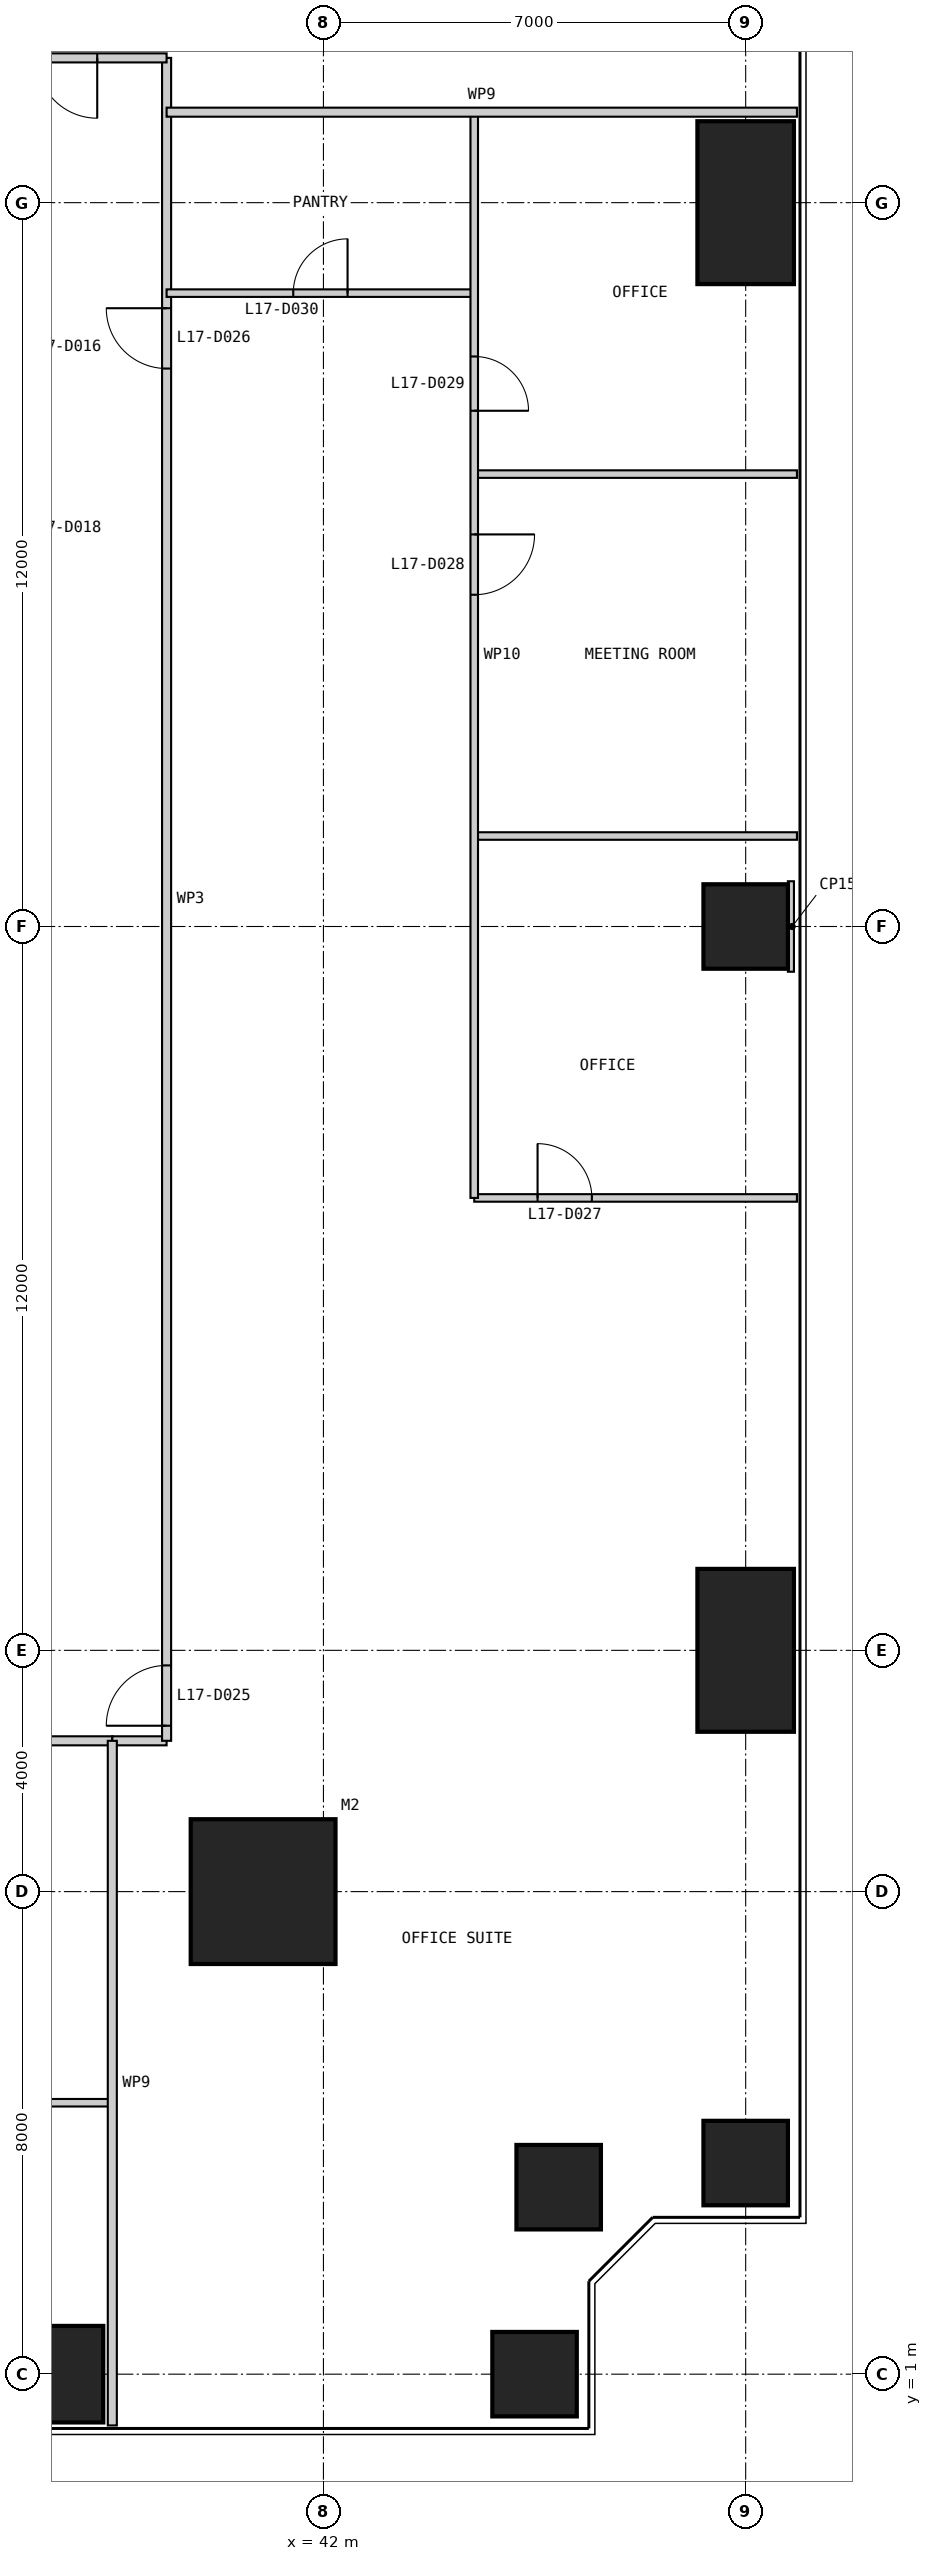
"""IFC4 building model, lengths in metres.
Left out: names, types, materials, properties, quantities, classifications, styles, units other than length and angle.
Written with IfcOpenShell. Run it as: python <this file> out.ifc"""

import sys

from ifc_helpers import new_model, si_unit, direction, frame, frame_2d, origin, origin_2d, place, context, subcontext, project, spatial, rectangle, extrude, element, fill, save


model = new_model("IFC4")
c1 = context("Model", 3, precision=1e-05, world=origin(), true_north=direction((0.0, 1.0)))
c2 = subcontext(c1, "Body", "Model", "MODEL_VIEW")
j1 = project(units=[si_unit("LENGTHUNIT", "METRE"), si_unit("PLANEANGLEUNIT", "RADIAN")], contexts=[c1])
p1 = place(None, origin())
s1 = spatial("IfcSite", under=j1, at=p1, CompositionType="ELEMENT")
p2 = place(p1, origin())
s2 = spatial("IfcBuilding", under=s1, at=p2, CompositionType="ELEMENT")
p3 = place(p2, frame((0.0, 0.0, 75.0)))
s3 = spatial("IfcBuildingStorey", under=s2, at=p3, CompositionType="ELEMENT", Elevation=75.0)
p4 = place(p3, frame((41.0, 9.0, 0.0), z_axis=(0.0, 0.0, 1.0), x_axis=(1.0, 0.0, 0.0)))
e1 = element("IfcColumn", 1, at=p4, inside=s3, PredefinedType="COLUMN", context=c2, shape_type="SweptSolid", body=[
    extrude(rectangle(XDim=2.4, YDim=2.4, at=origin_2d()), origin(), (0.0, 0.0, 1.0), 4.0),
])
p5 = place(p3, frame((37.0, 1.0, 0.0), z_axis=(0.0, 0.0, 1.0), x_axis=(1.0, 0.0, 0.0)))
e2 = element("IfcColumn", 2, at=p5, inside=s3, PredefinedType="COLUMN", context=c2, shape_type="SweptSolid", body=[
    extrude(rectangle(XDim=2.7, YDim=1.6, at=origin_2d()), origin(), (0.0, 0.0, 1.0), 4.0),
])
for number, where, z_axis, x_axis in (
    (3, (45.5, 1.0, 0.0), (0.0, 0.0, 1.0), (1.0, 0.0, 0.0)),
    (4, (45.9, 4.1, 0.0), (0.0, 0.0, 1.0), (1.0, 0.0, 0.0)),
    (5, (49.0, 4.5, 0.0), (0.0, 0.0, 1.0), (1.0, 0.0, 0.0)),
):
    element("IfcColumn", number, at=place(p3, frame(where, z_axis=z_axis, x_axis=x_axis)), inside=s3, PredefinedType="COLUMN", context=c2, shape_type="SweptSolid", body=[
        extrude(rectangle(XDim=1.4, YDim=1.4, at=origin_2d()), origin(), (0.0, 0.0, 1.0), 4.0),
    ])
p6 = place(p3, frame((49.0, 13.0, 0.0), z_axis=(0.0, 0.0, 1.0), x_axis=(1.0, 0.0, 0.0)))
e6 = element("IfcColumn", 6, at=p6, inside=s3, PredefinedType="COLUMN", context=c2, shape_type="SweptSolid", body=[
    extrude(rectangle(XDim=1.6, YDim=2.7, at=origin_2d()), origin(), (0.0, 0.0, 1.0), 4.0),
])
p7 = place(p3, frame((49.0, 25.0, 0.0), z_axis=(0.0, 0.0, 1.0), x_axis=(1.0, 0.0, 0.0)))
e7 = element("IfcColumn", 7, at=p7, inside=s3, PredefinedType="COLUMN", context=c2, shape_type="SweptSolid", body=[
    extrude(rectangle(XDim=1.4, YDim=1.4, at=origin_2d()), origin(), (0.0, 0.0, 1.0), 4.0),
])
p8 = place(p3, frame((49.0, 37.0, 0.0), z_axis=(0.0, 0.0, 1.0), x_axis=(1.0, 0.0, 0.0)))
e8 = element("IfcColumn", 8, at=p8, inside=s3, PredefinedType="COLUMN", context=c2, shape_type="SweptSolid", body=[
    extrude(rectangle(XDim=1.6, YDim=2.7, at=origin_2d()), origin(), (0.0, 0.0, 1.0), 4.0),
])
p9 = place(p3, frame((11.5, 11.5, 0.0), z_axis=(0.0, 0.0, 1.0), x_axis=(1.0, 0.0, 0.0)))
e9 = element("IfcWall", 9, at=p9, inside=s3, PredefinedType="PARTITIONING", context=c2, shape_type="SweptSolid", body=[
    extrude(rectangle(XDim=27.0, YDim=0.15, at=frame_2d((13.5, 0.0))), origin(), (0.0, 0.0, 1.0), 3.85),
])
p10 = place(p9, frame((11.5, 0.0, 0.0)))
e10 = element("IfcOpeningElement", 10, at=p10, cuts=e9, PredefinedType="OPENING", context=c2, shape_type="SweptSolid", body=[
    extrude(rectangle(XDim=1.0, YDim=2.2, at=frame_2d((0.5, 1.1))), frame((0.0, 0.085, 0.0), z_axis=(0.0, -1.0, 0.0), x_axis=(1.0, 0.0, 0.0)), (0.0, 0.0, 1.0), 0.17),
])
p11 = place(p3, frame((14.5, 5.5, 0.0), z_axis=(0.0, 0.0, 1.0), x_axis=(1.0, 0.0, 0.0)))
e11 = element("IfcWall", 11, at=p11, inside=s3, PredefinedType="PARTITIONING", context=c2, shape_type="SweptSolid", body=[
    extrude(rectangle(XDim=24.0, YDim=0.125, at=frame_2d((12.0, 0.0))), origin(), (0.0, 0.0, 1.0), 3.85),
])
p12 = place(p11, frame((10.05, 0.0, 0.0)))
e12 = element("IfcOpeningElement", 12, at=p12, cuts=e11, PredefinedType="OPENING", context=c2, shape_type="SweptSolid", body=[
    extrude(rectangle(XDim=0.9, YDim=2.2, at=frame_2d((0.45, 1.1))), frame((0.0, 0.073, 0.0), z_axis=(0.0, -1.0, 0.0), x_axis=(1.0, 0.0, 0.0)), (0.0, 0.0, 1.0), 0.145),
])
p13 = place(p11, frame((16.05, 0.0, 0.0)))
e13 = element("IfcOpeningElement", 13, at=p13, cuts=e11, PredefinedType="OPENING", context=c2, shape_type="SweptSolid", body=[
    extrude(rectangle(XDim=0.9, YDim=2.2, at=frame_2d((0.45, 1.1))), frame((0.0, 0.073, 0.0), z_axis=(0.0, -1.0, 0.0), x_axis=(1.0, 0.0, 0.0)), (0.0, 0.0, 1.0), 0.145),
])
p14 = place(p11, frame((19.05, 0.0, 0.0)))
e14 = element("IfcOpeningElement", 14, at=p14, cuts=e11, PredefinedType="OPENING", context=c2, shape_type="SweptSolid", body=[
    extrude(rectangle(XDim=0.9, YDim=2.2, at=frame_2d((0.45, 1.1))), frame((0.0, 0.073, 0.0), z_axis=(0.0, -1.0, 0.0), x_axis=(1.0, 0.0, 0.0)), (0.0, 0.0, 1.0), 0.145),
])
p15 = place(p3, frame((38.5, 11.5, 0.0), z_axis=(0.0, 0.0, 1.0), x_axis=(1.0, 0.0, 0.0)))
e15 = element("IfcWall", 15, at=p15, inside=s3, PredefinedType="PARTITIONING", context=c2, shape_type="SweptSolid", body=[
    extrude(rectangle(XDim=0.9, YDim=0.15, at=frame_2d((0.45, 0.0))), origin(), (0.0, 0.0, 1.0), 3.85),
])
p16 = place(p3, frame((39.4, 11.5, 0.0), z_axis=(0.0, 0.0, 1.0), x_axis=(0.0, 1.0, 0.0)))
e16 = element("IfcWall", 16, at=p16, inside=s3, PredefinedType="PARTITIONING", context=c2, shape_type="SweptSolid", body=[
    extrude(rectangle(XDim=27.9, YDim=0.15, at=frame_2d((13.95, 0.0))), origin(), (0.0, 0.0, 1.0), 3.85),
])
p17 = place(p16, frame((0.25, 0.0, 0.0)))
e17 = element("IfcOpeningElement", 17, at=p17, cuts=e16, PredefinedType="OPENING", context=c2, shape_type="SweptSolid", body=[
    extrude(rectangle(XDim=1.0, YDim=2.2, at=frame_2d((0.5, 1.1))), frame((0.0, 0.085, 0.0), z_axis=(0.0, -1.0, 0.0), x_axis=(1.0, 0.0, 0.0)), (0.0, 0.0, 1.0), 0.17),
])
p18 = place(p16, frame((22.75, 0.0, 0.0)))
e18 = element("IfcOpeningElement", 18, at=p18, cuts=e16, PredefinedType="OPENING", context=c2, shape_type="SweptSolid", body=[
    extrude(rectangle(XDim=1.0, YDim=2.2, at=frame_2d((0.5, 1.1))), frame((0.0, 0.085, 0.0), z_axis=(0.0, -1.0, 0.0), x_axis=(1.0, 0.0, 0.0)), (0.0, 0.0, 1.0), 0.17),
])
p19 = place(p3, frame((38.5, 0.15, 0.0), z_axis=(0.0, 0.0, 1.0), x_axis=(0.0, 1.0, 0.0)))
e19 = element("IfcWall", 19, at=p19, inside=s3, PredefinedType="PARTITIONING", context=c2, shape_type="SweptSolid", body=[
    extrude(rectangle(XDim=11.35, YDim=0.15, at=frame_2d((5.675, 0.0))), origin(), (0.0, 0.0, 1.0), 3.85),
])
p20 = place(p3, frame((49.85, 20.5, 0.0), z_axis=(0.0, 0.0, 1.0), x_axis=(-1.0, 0.0, 0.0)))
e20 = element("IfcWall", 20, at=p20, inside=s3, PredefinedType="PARTITIONING", context=c2, shape_type="SweptSolid", body=[
    extrude(rectangle(XDim=5.35, YDim=0.125, at=frame_2d((2.675, 0.0))), origin(), (0.0, 0.0, 1.0), 3.85),
])
p21 = place(p20, frame((3.4, 0.0, 0.0)))
e21 = element("IfcOpeningElement", 21, at=p21, cuts=e20, PredefinedType="OPENING", context=c2, shape_type="SweptSolid", body=[
    extrude(rectangle(XDim=0.9, YDim=2.2, at=frame_2d((0.45, 1.1))), frame((0.0, 0.073, 0.0), z_axis=(0.0, -1.0, 0.0), x_axis=(1.0, 0.0, 0.0)), (0.0, 0.0, 1.0), 0.145),
])
for number, where, z_axis, x_axis in (
    (22, (49.85, 26.5, 0.0), (0.0, 0.0, 1.0), (-1.0, 0.0, 0.0)),
    (23, (49.85, 32.5, 0.0), (0.0, 0.0, 1.0), (-1.0, 0.0, 0.0)),
):
    element("IfcWall", number, at=place(p3, frame(where, z_axis=z_axis, x_axis=x_axis)), inside=s3, PredefinedType="PARTITIONING", context=c2, shape_type="SweptSolid", body=[
        extrude(rectangle(XDim=5.35, YDim=0.125, at=frame_2d((2.675, 0.0))), origin(), (0.0, 0.0, 1.0), 3.85),
    ])
p22 = place(p3, frame((44.5, 35.5, 0.0), z_axis=(0.0, 0.0, 1.0), x_axis=(-1.0, 0.0, 0.0)))
e24 = element("IfcWall", 24, at=p22, inside=s3, PredefinedType="PARTITIONING", context=c2, shape_type="SweptSolid", body=[
    extrude(rectangle(XDim=5.1, YDim=0.125, at=frame_2d((2.55, 0.0))), origin(), (0.0, 0.0, 1.0), 3.85),
])
p23 = place(p22, frame((2.1, 0.0, 0.0)))
e25 = element("IfcOpeningElement", 25, at=p23, cuts=e24, PredefinedType="OPENING", context=c2, shape_type="SweptSolid", body=[
    extrude(rectangle(XDim=0.9, YDim=2.2, at=frame_2d((0.45, 1.1))), frame((0.0, 0.073, 0.0), z_axis=(0.0, -1.0, 0.0), x_axis=(1.0, 0.0, 0.0)), (0.0, 0.0, 1.0), 0.145),
])
p24 = place(p3, frame((44.5, 20.5, 0.0), z_axis=(0.0, 0.0, 1.0), x_axis=(0.0, 1.0, 0.0)))
e26 = element("IfcWall", 26, at=p24, inside=s3, PredefinedType="PARTITIONING", context=c2, shape_type="SweptSolid", body=[
    extrude(rectangle(XDim=18.0, YDim=0.125, at=frame_2d((9.0, 0.0))), origin(), (0.0, 0.0, 1.0), 3.85),
])
p25 = place(p24, frame((10.0, 0.0, 0.0)))
e27 = element("IfcOpeningElement", 27, at=p25, cuts=e26, PredefinedType="OPENING", context=c2, shape_type="SweptSolid", body=[
    extrude(rectangle(XDim=1.0, YDim=2.2, at=frame_2d((0.5, 1.1))), frame((0.0, 0.073, 0.0), z_axis=(0.0, -1.0, 0.0), x_axis=(1.0, 0.0, 0.0)), (0.0, 0.0, 1.0), 0.145),
])
p26 = place(p24, frame((13.05, 0.0, 0.0)))
e28 = element("IfcOpeningElement", 28, at=p26, cuts=e26, PredefinedType="OPENING", context=c2, shape_type="SweptSolid", body=[
    extrude(rectangle(XDim=0.9, YDim=2.2, at=frame_2d((0.45, 1.1))), frame((0.0, 0.073, 0.0), z_axis=(0.0, -1.0, 0.0), x_axis=(1.0, 0.0, 0.0)), (0.0, 0.0, 1.0), 0.145),
])
p27 = place(p3, frame((39.4, 39.4, 0.0), z_axis=(0.0, 0.0, 1.0), x_axis=(-1.0, 0.0, 0.0)))
e29 = element("IfcWall", 29, at=p27, inside=s3, PredefinedType="PARTITIONING", context=c2, shape_type="SweptSolid", body=[
    extrude(rectangle(XDim=28.8, YDim=0.15, at=frame_2d((14.4, 0.0))), origin(), (0.0, 0.0, 1.0), 3.85),
])
p28 = place(p27, frame((1.15, 0.0, 0.0)))
e30 = element("IfcOpeningElement", 30, at=p28, cuts=e29, PredefinedType="OPENING", context=c2, shape_type="SweptSolid", body=[
    extrude(rectangle(XDim=1.0, YDim=2.2, at=frame_2d((0.5, 1.1))), frame((0.0, 0.085, 0.0), z_axis=(0.0, -1.0, 0.0), x_axis=(1.0, 0.0, 0.0)), (0.0, 0.0, 1.0), 0.17),
])
p29 = place(p27, frame((23.65, 0.0, 0.0)))
e31 = element("IfcOpeningElement", 31, at=p29, cuts=e29, PredefinedType="OPENING", context=c2, shape_type="SweptSolid", body=[
    extrude(rectangle(XDim=1.0, YDim=2.2, at=frame_2d((0.5, 1.1))), frame((0.0, 0.085, 0.0), z_axis=(0.0, -1.0, 0.0), x_axis=(1.0, 0.0, 0.0)), (0.0, 0.0, 1.0), 0.17),
])
p30 = place(p3, frame((49.85, 38.5, 0.0), z_axis=(0.0, 0.0, 1.0), x_axis=(-1.0, 0.0, 0.0)))
e32 = element("IfcWall", 32, at=p30, inside=s3, PredefinedType="PARTITIONING", context=c2, shape_type="SweptSolid", body=[
    extrude(rectangle(XDim=10.45, YDim=0.15, at=frame_2d((5.225, 0.0))), origin(), (0.0, 0.0, 1.0), 3.85),
])
p31 = place(p3, frame((49.8, 25.0, 0.0), z_axis=(0.0, 0.0, 1.0), x_axis=(-1.0, 0.0, 0.0)))
e33 = element("IfcWall", 33, at=p31, inside=s3, PredefinedType="PARTITIONING", context=c2, shape_type="SweptSolid", body=[
    extrude(rectangle(XDim=0.1, YDim=1.5, at=frame_2d((0.05, 0.0))), origin(), (0.0, 0.0, 1.0), 3.85),
])
p32 = place(p17, origin())
e34 = element("IfcDoor", 34, at=p32, inside=s3, OperationType="SINGLE_SWING_LEFT", PredefinedType="DOOR", context=c2, shape_type="SweptSolid", body=[
    extrude(rectangle(XDim=1.0, YDim=2.2, at=frame_2d((0.5, 1.1))), frame((0.0, 0.025, 0.0), z_axis=(0.0, -1.0, 0.0), x_axis=(1.0, 0.0, 0.0)), (0.0, 0.0, 1.0), 0.05),
])
fill(e17, e34)
p33 = place(p18, origin())
e35 = element("IfcDoor", 35, at=p33, inside=s3, OperationType="SINGLE_SWING_RIGHT", PredefinedType="DOOR", context=c2, shape_type="SweptSolid", body=[
    extrude(rectangle(XDim=1.0, YDim=2.2, at=frame_2d((0.5, 1.1))), frame((0.0, 0.025, 0.0), z_axis=(0.0, -1.0, 0.0), x_axis=(1.0, 0.0, 0.0)), (0.0, 0.0, 1.0), 0.05),
])
fill(e18, e35)
p34 = place(p21, frame((0.9, 0.0, 0.0), z_axis=(0.0, 0.0, 1.0), x_axis=(-1.0, 0.0, 0.0)))
e36 = element("IfcDoor", 36, at=p34, inside=s3, OperationType="SINGLE_SWING_LEFT", PredefinedType="DOOR", context=c2, shape_type="SweptSolid", body=[
    extrude(rectangle(XDim=0.9, YDim=2.2, at=frame_2d((0.45, 1.1))), frame((0.0, 0.025, 0.0), z_axis=(0.0, -1.0, 0.0), x_axis=(1.0, 0.0, 0.0)), (0.0, 0.0, 1.0), 0.05),
])
fill(e21, e36)
p35 = place(p25, frame((1.0, 0.0, 0.0), z_axis=(0.0, 0.0, 1.0), x_axis=(-1.0, 0.0, 0.0)))
e37 = element("IfcDoor", 37, at=p35, inside=s3, OperationType="SINGLE_SWING_LEFT", PredefinedType="DOOR", context=c2, shape_type="SweptSolid", body=[
    extrude(rectangle(XDim=1.0, YDim=2.2, at=frame_2d((0.5, 1.1))), frame((0.0, 0.025, 0.0), z_axis=(0.0, -1.0, 0.0), x_axis=(1.0, 0.0, 0.0)), (0.0, 0.0, 1.0), 0.05),
])
fill(e27, e37)
p36 = place(p26, frame((0.9, 0.0, 0.0), z_axis=(0.0, 0.0, 1.0), x_axis=(-1.0, 0.0, 0.0)))
e38 = element("IfcDoor", 38, at=p36, inside=s3, OperationType="SINGLE_SWING_RIGHT", PredefinedType="DOOR", context=c2, shape_type="SweptSolid", body=[
    extrude(rectangle(XDim=0.9, YDim=2.2, at=frame_2d((0.45, 1.1))), frame((0.0, 0.025, 0.0), z_axis=(0.0, -1.0, 0.0), x_axis=(1.0, 0.0, 0.0)), (0.0, 0.0, 1.0), 0.05),
])
fill(e28, e38)
p37 = place(p23, frame((0.9, 0.0, 0.0), z_axis=(0.0, 0.0, 1.0), x_axis=(-1.0, 0.0, 0.0)))
e39 = element("IfcDoor", 39, at=p37, inside=s3, OperationType="SINGLE_SWING_RIGHT", PredefinedType="DOOR", context=c2, shape_type="SweptSolid", body=[
    extrude(rectangle(XDim=0.9, YDim=2.2, at=frame_2d((0.45, 1.1))), frame((0.0, 0.025, 0.0), z_axis=(0.0, -1.0, 0.0), x_axis=(1.0, 0.0, 0.0)), (0.0, 0.0, 1.0), 0.05),
])
fill(e25, e39)
p38 = place(p28, origin())
e40 = element("IfcDoor", 40, at=p38, inside=s3, OperationType="SINGLE_SWING_LEFT", PredefinedType="DOOR", context=c2, shape_type="SweptSolid", body=[
    extrude(rectangle(XDim=1.0, YDim=2.2, at=frame_2d((0.5, 1.1))), frame((0.0, 0.025, 0.0), z_axis=(0.0, -1.0, 0.0), x_axis=(1.0, 0.0, 0.0)), (0.0, 0.0, 1.0), 0.05),
])
fill(e30, e40)
save(model, sys.argv[1])
